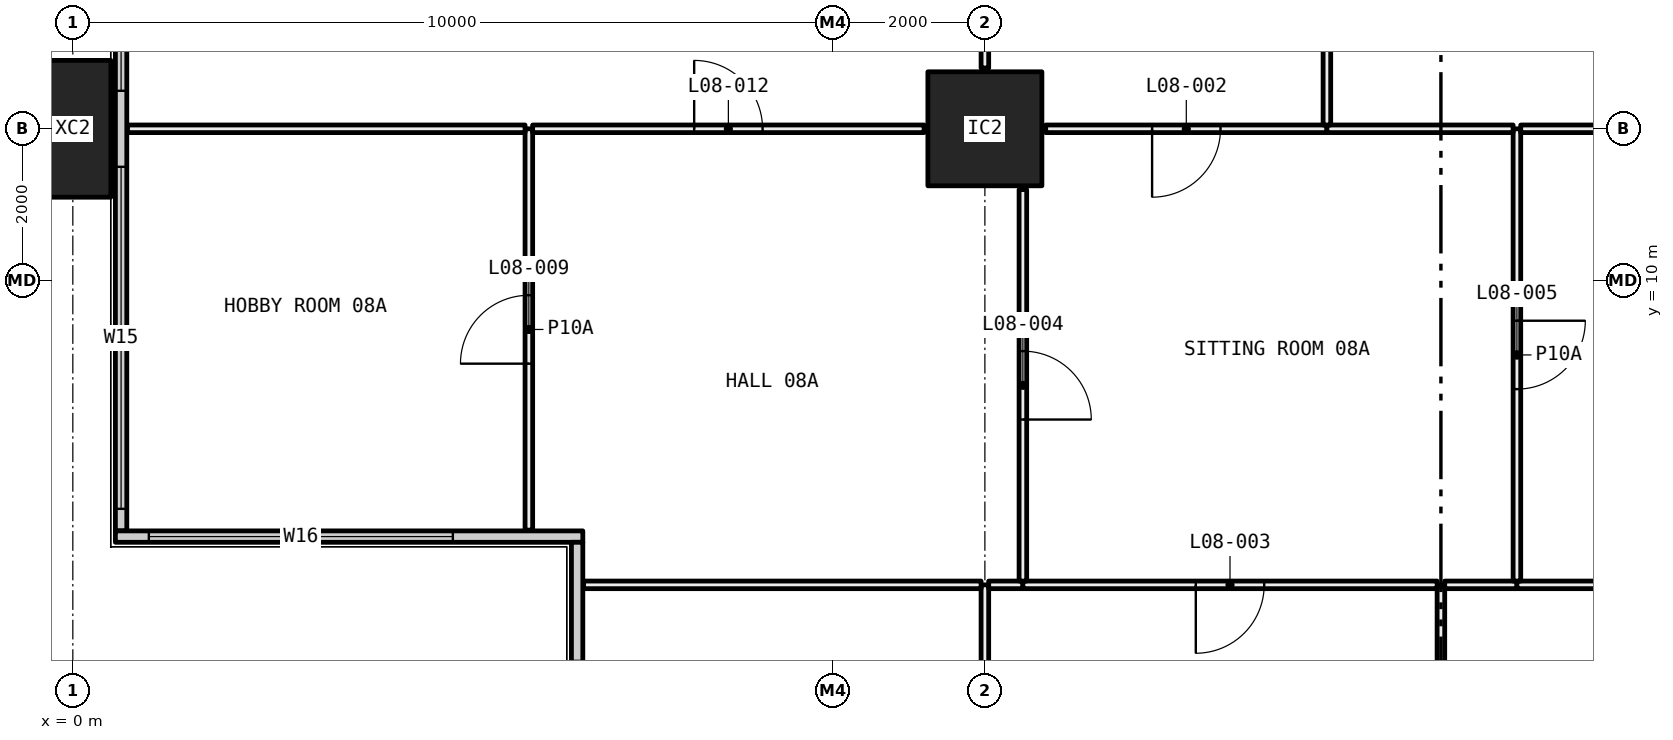
"""IFC4 building model, lengths in metres.
Left out: names, types, materials, properties, quantities, classifications, styles, units other than length and angle.
Written with IfcOpenShell. Run it as: python <this file> out.ifc"""

import sys

from ifc_helpers import new_model, si_unit, direction, frame, frame_2d, origin, origin_2d, place, context, subcontext, project, spatial, rectangle, hollow_rectangle, extrude, element, fill, save


model = new_model("IFC4")
c1 = context("Model", 3, precision=1e-05, world=origin(), true_north=direction((0.0, 1.0)))
c2 = subcontext(c1, "Body", "Model", "MODEL_VIEW")
j1 = project(units=[si_unit("LENGTHUNIT", "METRE"), si_unit("PLANEANGLEUNIT", "RADIAN")], contexts=[c1])
p1 = place(None, origin())
s1 = spatial("IfcSite", under=j1, at=p1, CompositionType="ELEMENT")
p2 = place(p1, origin())
s2 = spatial("IfcBuilding", under=s1, at=p2, CompositionType="ELEMENT")
p3 = place(p2, frame((0.0, 0.0, 40.35)))
s3 = spatial("IfcBuildingStorey", under=s2, at=p3, CompositionType="ELEMENT", Elevation=40.35)
p4 = place(p3, frame((0.0, 12.0, -0.4), z_axis=(0.0, 0.0, 1.0), x_axis=(0.0, 1.0, 0.0)))
e1 = element("IfcColumn", 1, at=p4, inside=s3, PredefinedType="COLUMN", context=c2, shape_type="SweptSolid", body=[
    extrude(hollow_rectangle(XDim=1.8, YDim=1.0, WallThickness=0.07, at=origin_2d()), origin(), (0.0, 0.0, 1.0), 3.45),
])
p5 = place(p3, frame((12.0, 12.0, 0.0), z_axis=(0.0, 0.0, 1.0), x_axis=(1.0, 0.0, 0.0)))
e2 = element("IfcColumn", 2, at=p5, inside=s3, PredefinedType="COLUMN", context=c2, shape_type="SweptSolid", body=[
    extrude(hollow_rectangle(XDim=1.5, YDim=1.5, WallThickness=0.065, at=origin_2d()), origin(), (0.0, 0.0, 1.0), 3.05),
])
p6 = place(p3, frame((0.635, 6.71, 0.0), z_axis=(0.0, 0.0, 1.0), x_axis=(0.0, 1.0, 0.0)))
e3 = element("IfcWall", 3, at=p6, inside=s3, PredefinedType="ELEMENTEDWALL", context=c2, shape_type="SweptSolid", body=[
    extrude(rectangle(XDim=34.58, YDim=0.15, at=frame_2d((17.29, 0.0))), origin(), (0.0, 0.0, 1.0), 3.05),
])
p7 = place(p6, frame((0.29, 0.0, 0.45)))
e4 = element("IfcOpeningElement", 4, at=p7, cuts=e3, PredefinedType="OPENING", context=c2, shape_type="SweptSolid", body=[
    extrude(rectangle(XDim=4.5, YDim=2.55, at=frame_2d((2.25, 1.275))), frame((0.0, 0.085, 0.0), z_axis=(0.0, -1.0, 0.0), x_axis=(1.0, 0.0, 0.0)), (0.0, 0.0, 1.0), 0.17),
])
p8 = place(p6, frame((5.79, 0.0, 0.45)))
e5 = element("IfcOpeningElement", 5, at=p8, cuts=e3, PredefinedType="OPENING", context=c2, shape_type="SweptSolid", body=[
    extrude(rectangle(XDim=3.0, YDim=2.55, at=frame_2d((1.5, 1.275))), frame((0.0, 0.085, 0.0), z_axis=(0.0, -1.0, 0.0), x_axis=(1.0, 0.0, 0.0)), (0.0, 0.0, 1.0), 0.17),
])
p9 = place(p6, frame((13.79, 0.0, 0.45)))
e6 = element("IfcOpeningElement", 6, at=p9, cuts=e3, PredefinedType="OPENING", context=c2, shape_type="SweptSolid", body=[
    extrude(rectangle(XDim=3.0, YDim=2.55, at=frame_2d((1.5, 1.275))), frame((0.0, 0.085, 0.0), z_axis=(0.0, -1.0, 0.0), x_axis=(1.0, 0.0, 0.0)), (0.0, 0.0, 1.0), 0.17),
])
p10 = place(p6, frame((17.79, 0.0, 0.45)))
e7 = element("IfcOpeningElement", 7, at=p10, cuts=e3, PredefinedType="OPENING", context=c2, shape_type="SweptSolid", body=[
    extrude(rectangle(XDim=3.0, YDim=2.55, at=frame_2d((1.5, 1.275))), frame((0.0, 0.085, 0.0), z_axis=(0.0, -1.0, 0.0), x_axis=(1.0, 0.0, 0.0)), (0.0, 0.0, 1.0), 0.17),
])
p11 = place(p6, frame((26.79, 0.0, 0.45)))
e8 = element("IfcOpeningElement", 8, at=p11, cuts=e3, PredefinedType="OPENING", context=c2, shape_type="SweptSolid", body=[
    extrude(rectangle(XDim=2.0, YDim=2.55, at=frame_2d((1.0, 1.275))), frame((0.0, 0.085, 0.0), z_axis=(0.0, -1.0, 0.0), x_axis=(1.0, 0.0, 0.0)), (0.0, 0.0, 1.0), 0.17),
])
p12 = place(p6, frame((29.79, 0.0, 0.45)))
e9 = element("IfcOpeningElement", 9, at=p12, cuts=e3, PredefinedType="OPENING", context=c2, shape_type="SweptSolid", body=[
    extrude(rectangle(XDim=4.5, YDim=2.55, at=frame_2d((2.25, 1.275))), frame((0.0, 0.085, 0.0), z_axis=(0.0, -1.0, 0.0), x_axis=(1.0, 0.0, 0.0)), (0.0, 0.0, 1.0), 0.17),
])
p13 = place(p3, frame((0.56, 6.635, 0.0), z_axis=(0.0, 0.0, 1.0), x_axis=(1.0, 0.0, 0.0)))
e10 = element("IfcWall", 10, at=p13, inside=s3, PredefinedType="ELEMENTEDWALL", context=c2, shape_type="SweptSolid", body=[
    extrude(rectangle(XDim=6.15, YDim=0.15, at=frame_2d((3.075, 0.0))), origin(), (0.0, 0.0, 1.0), 3.05),
])
p14 = place(p13, frame((0.44, 0.0, 0.45)))
e11 = element("IfcOpeningElement", 11, at=p14, cuts=e10, PredefinedType="OPENING", context=c2, shape_type="SweptSolid", body=[
    extrude(rectangle(XDim=4.0, YDim=2.55, at=frame_2d((2.0, 1.275))), frame((0.0, 0.085, 0.0), z_axis=(0.0, -1.0, 0.0), x_axis=(1.0, 0.0, 0.0)), (0.0, 0.0, 1.0), 0.17),
])
p15 = place(p3, frame((6.635, 0.71, 0.0), z_axis=(0.0, 0.0, 1.0), x_axis=(0.0, 1.0, 0.0)))
e12 = element("IfcWall", 12, at=p15, inside=s3, PredefinedType="ELEMENTEDWALL", context=c2, shape_type="SweptSolid", body=[
    extrude(rectangle(XDim=5.85, YDim=0.15, at=frame_2d((2.925, 0.0))), origin(), (0.0, 0.0, 1.0), 3.05),
])
p16 = place(p15, frame((0.29, 0.0, 0.45)))
e13 = element("IfcOpeningElement", 13, at=p16, cuts=e12, PredefinedType="OPENING", context=c2, shape_type="SweptSolid", body=[
    extrude(rectangle(XDim=4.0, YDim=2.55, at=frame_2d((2.0, 1.275))), frame((0.0, 0.085, 0.0), z_axis=(0.0, -1.0, 0.0), x_axis=(1.0, 0.0, 0.0)), (0.0, 0.0, 1.0), 0.17),
])
p17 = place(p3, frame((12.0, 0.72, 0.0), z_axis=(0.0, 0.0, 1.0), x_axis=(0.0, 1.0, 0.0)))
e14 = element("IfcWall", 14, at=p17, inside=s3, PredefinedType="PARTITIONING", context=c2, shape_type="SweptSolid", body=[
    extrude(rectangle(XDim=5.28, YDim=0.1, at=frame_2d((2.64, 0.0))), origin(), (0.0, 0.0, 1.0), 2.45),
])
p18 = place(p17, frame((2.19, 0.0, 0.0)))
e15 = element("IfcOpeningElement", 15, at=p18, cuts=e14, PredefinedType="OPENING", context=c2, shape_type="SweptSolid", body=[
    extrude(rectangle(XDim=0.9, YDim=2.1, at=frame_2d((0.45, 1.05))), frame((0.0, 0.06, 0.0), z_axis=(0.0, -1.0, 0.0), x_axis=(1.0, 0.0, 0.0)), (0.0, 0.0, 1.0), 0.12),
])
p19 = place(p3, frame((11.95, 6.0, 0.0), z_axis=(0.0, 0.0, 1.0), x_axis=(-1.0, 0.0, 0.0)))
e16 = element("IfcWall", 16, at=p19, inside=s3, PredefinedType="PARTITIONING", context=c2, shape_type="SweptSolid", body=[
    extrude(rectangle(XDim=5.23, YDim=0.1, at=frame_2d((2.615, 0.0))), origin(), (0.0, 0.0, 1.0), 2.45),
])
p20 = place(p3, frame((18.0, 0.72, 0.0), z_axis=(0.0, 0.0, 1.0), x_axis=(0.0, 1.0, 0.0)))
e17 = element("IfcWall", 17, at=p20, inside=s3, PredefinedType="PARTITIONING", context=c2, shape_type="SweptSolid", body=[
    extrude(rectangle(XDim=5.28, YDim=0.1, at=frame_2d((2.64, 0.0))), origin(), (0.0, 0.0, 1.0), 3.05),
])
p21 = place(p20, frame((2.19, 0.0, 0.0)))
e18 = element("IfcOpeningElement", 18, at=p21, cuts=e17, PredefinedType="OPENING", context=c2, shape_type="SweptSolid", body=[
    extrude(rectangle(XDim=0.9, YDim=2.1, at=frame_2d((0.45, 1.05))), frame((0.0, 0.06, 0.0), z_axis=(0.0, -1.0, 0.0), x_axis=(1.0, 0.0, 0.0)), (0.0, 0.0, 1.0), 0.12),
])
p22 = place(p3, frame((12.5, 6.0, 0.0), z_axis=(0.0, 0.0, 1.0), x_axis=(-1.0, 0.0, 0.0)))
e19 = element("IfcWall", 19, at=p22, inside=s3, PredefinedType="PARTITIONING", context=c2, shape_type="SweptSolid", body=[
    extrude(rectangle(XDim=0.45, YDim=0.1, at=frame_2d((0.225, 0.0))), origin(), (0.0, 0.0, 1.0), 2.45),
])
p23 = place(p3, frame((17.95, 6.0, 0.0), z_axis=(0.0, 0.0, 1.0), x_axis=(-1.0, 0.0, 0.0)))
e20 = element("IfcWall", 20, at=p23, inside=s3, PredefinedType="PARTITIONING", context=c2, shape_type="SweptSolid", body=[
    extrude(rectangle(XDim=5.45, YDim=0.1, at=frame_2d((2.725, 0.0))), origin(), (0.0, 0.0, 1.0), 3.05),
])
p24 = place(p23, frame((2.275, 0.0, 0.0)))
e21 = element("IfcOpeningElement", 21, at=p24, cuts=e20, PredefinedType="OPENING", context=c2, shape_type="SweptSolid", body=[
    extrude(rectangle(XDim=0.9, YDim=2.1, at=frame_2d((0.45, 1.05))), frame((0.0, 0.06, 0.0), z_axis=(0.0, -1.0, 0.0), x_axis=(1.0, 0.0, 0.0)), (0.0, 0.0, 1.0), 0.12),
])
p25 = place(p3, frame((19.0, 6.0, 0.0), z_axis=(0.0, 0.0, 1.0), x_axis=(-1.0, 0.0, 0.0)))
e22 = element("IfcWall", 22, at=p25, inside=s3, PredefinedType="PARTITIONING", context=c2, shape_type="SweptSolid", body=[
    extrude(rectangle(XDim=0.95, YDim=0.1, at=frame_2d((0.475, 0.0))), origin(), (0.0, 0.0, 1.0), 3.05),
])
p26 = place(p3, frame((23.95, 6.0, 0.0), z_axis=(0.0, 0.0, 1.0), x_axis=(-1.0, 0.0, 0.0)))
e23 = element("IfcWall", 23, at=p26, inside=s3, PredefinedType="PARTITIONING", context=c2, shape_type="SweptSolid", body=[
    extrude(rectangle(XDim=4.95, YDim=0.1, at=frame_2d((2.475, 0.0))), origin(), (0.0, 0.0, 1.0), 2.45),
])
p27 = place(p3, frame((6.0, 6.72, 0.0), z_axis=(0.0, 0.0, 1.0), x_axis=(0.0, 1.0, 0.0)))
e24 = element("IfcWall", 24, at=p27, inside=s3, PredefinedType="PARTITIONING", context=c2, shape_type="SweptSolid", body=[
    extrude(rectangle(XDim=5.28, YDim=0.1, at=frame_2d((2.64, 0.0))), origin(), (0.0, 0.0, 1.0), 2.45),
])
p28 = place(p27, frame((2.19, 0.0, 0.0)))
e25 = element("IfcOpeningElement", 25, at=p28, cuts=e24, PredefinedType="OPENING", context=c2, shape_type="SweptSolid", body=[
    extrude(rectangle(XDim=0.9, YDim=2.1, at=frame_2d((0.45, 1.05))), frame((0.0, 0.06, 0.0), z_axis=(0.0, -1.0, 0.0), x_axis=(1.0, 0.0, 0.0)), (0.0, 0.0, 1.0), 0.12),
])
p29 = place(p3, frame((5.95, 12.0, 0.0), z_axis=(0.0, 0.0, 1.0), x_axis=(-1.0, 0.0, 0.0)))
e26 = element("IfcWall", 26, at=p29, inside=s3, PredefinedType="PARTITIONING", context=c2, shape_type="SweptSolid", body=[
    extrude(rectangle(XDim=5.23, YDim=0.1, at=frame_2d((2.615, 0.0))), origin(), (0.0, 0.0, 1.0), 2.45),
])
p30 = place(p3, frame((12.5, 6.05, 0.0), z_axis=(0.0, 0.0, 1.0), x_axis=(0.0, 1.0, 0.0)))
e27 = element("IfcWall", 27, at=p30, inside=s3, PredefinedType="PARTITIONING", context=c2, shape_type="SweptSolid", body=[
    extrude(rectangle(XDim=5.15, YDim=0.1, at=frame_2d((2.575, 0.0))), origin(), (0.0, 0.0, 1.0), 3.05),
])
p31 = place(p30, frame((2.125, 0.0, 0.0)))
e28 = element("IfcOpeningElement", 28, at=p31, cuts=e27, PredefinedType="OPENING", context=c2, shape_type="SweptSolid", body=[
    extrude(rectangle(XDim=0.9, YDim=2.1, at=frame_2d((0.45, 1.05))), frame((0.0, 0.06, 0.0), z_axis=(0.0, -1.0, 0.0), x_axis=(1.0, 0.0, 0.0)), (0.0, 0.0, 1.0), 0.12),
])
p32 = place(p3, frame((11.2, 12.0, 0.0), z_axis=(0.0, 0.0, 1.0), x_axis=(-1.0, 0.0, 0.0)))
e29 = element("IfcWall", 29, at=p32, inside=s3, PredefinedType="PARTITIONING", context=c2, shape_type="SweptSolid", body=[
    extrude(rectangle(XDim=5.15, YDim=0.1, at=frame_2d((2.575, 0.0))), origin(), (0.0, 0.0, 1.0), 2.45),
])
p33 = place(p32, frame((2.125, 0.0, 0.0)))
e30 = element("IfcOpeningElement", 30, at=p33, cuts=e29, PredefinedType="OPENING", context=c2, shape_type="SweptSolid", body=[
    extrude(rectangle(XDim=0.9, YDim=2.1, at=frame_2d((0.45, 1.05))), frame((0.0, 0.06, 0.0), z_axis=(0.0, -1.0, 0.0), x_axis=(1.0, 0.0, 0.0)), (0.0, 0.0, 1.0), 0.12),
])
p34 = place(p3, frame((19.0, 6.05, 0.0), z_axis=(0.0, 0.0, 1.0), x_axis=(0.0, 1.0, 0.0)))
e31 = element("IfcWall", 31, at=p34, inside=s3, PredefinedType="PARTITIONING", context=c2, shape_type="SweptSolid", body=[
    extrude(rectangle(XDim=5.95, YDim=0.1, at=frame_2d((2.975, 0.0))), origin(), (0.0, 0.0, 1.0), 2.45),
])
p35 = place(p34, frame((2.525, 0.0, 0.0)))
e32 = element("IfcOpeningElement", 32, at=p35, cuts=e31, PredefinedType="OPENING", context=c2, shape_type="SweptSolid", body=[
    extrude(rectangle(XDim=0.9, YDim=2.1, at=frame_2d((0.45, 1.05))), frame((0.0, 0.06, 0.0), z_axis=(0.0, -1.0, 0.0), x_axis=(1.0, 0.0, 0.0)), (0.0, 0.0, 1.0), 0.12),
])
p36 = place(p3, frame((16.5, 12.0, 0.0), z_axis=(0.0, 0.0, 1.0), x_axis=(-1.0, 0.0, 0.0)))
e33 = element("IfcWall", 33, at=p36, inside=s3, PredefinedType="PARTITIONING", context=c2, shape_type="SweptSolid", body=[
    extrude(rectangle(XDim=3.7, YDim=0.1, at=frame_2d((1.85, 0.0))), origin(), (0.0, 0.0, 1.0), 2.45),
])
p37 = place(p36, frame((1.4, 0.0, 0.0)))
e34 = element("IfcOpeningElement", 34, at=p37, cuts=e33, PredefinedType="OPENING", context=c2, shape_type="SweptSolid", body=[
    extrude(rectangle(XDim=0.9, YDim=2.1, at=frame_2d((0.45, 1.05))), frame((0.0, 0.06, 0.0), z_axis=(0.0, -1.0, 0.0), x_axis=(1.0, 0.0, 0.0)), (0.0, 0.0, 1.0), 0.12),
])
p38 = place(p3, frame((18.95, 12.0, 0.0), z_axis=(0.0, 0.0, 1.0), x_axis=(-1.0, 0.0, 0.0)))
e35 = element("IfcWall", 35, at=p38, inside=s3, PredefinedType="PARTITIONING", context=c2, shape_type="SweptSolid", body=[
    extrude(rectangle(XDim=2.45, YDim=0.1, at=frame_2d((1.225, 0.0))), origin(), (0.0, 0.0, 1.0), 2.45),
])
p39 = place(p3, frame((23.2, 12.0, 0.0), z_axis=(0.0, 0.0, 1.0), x_axis=(-1.0, 0.0, 0.0)))
e36 = element("IfcWall", 36, at=p39, inside=s3, PredefinedType="PARTITIONING", context=c2, shape_type="SweptSolid", body=[
    extrude(rectangle(XDim=4.15, YDim=0.1, at=frame_2d((2.075, 0.0))), origin(), (0.0, 0.0, 1.0), 2.45),
])
p40 = place(p3, frame((12.0, 12.8, 0.0), z_axis=(0.0, 0.0, 1.0), x_axis=(0.0, 1.0, 0.0)))
e37 = element("IfcWall", 37, at=p40, inside=s3, PredefinedType="PARTITIONING", context=c2, shape_type="SweptSolid", body=[
    extrude(rectangle(XDim=5.1, YDim=0.1, at=frame_2d((2.55, 0.0))), origin(), (0.0, 0.0, 1.0), 3.05),
])
p41 = place(p3, frame((16.5, 12.05, 0.0), z_axis=(0.0, 0.0, 1.0), x_axis=(0.0, 1.0, 0.0)))
e38 = element("IfcWall", 38, at=p41, inside=s3, PredefinedType="PARTITIONING", context=c2, shape_type="SweptSolid", body=[
    extrude(rectangle(XDim=5.85, YDim=0.1, at=frame_2d((2.925, 0.0))), origin(), (0.0, 0.0, 1.0), 2.45),
])
p42 = place(p41, frame((2.475, 0.0, 0.0)))
e39 = element("IfcOpeningElement", 39, at=p42, cuts=e38, PredefinedType="OPENING", context=c2, shape_type="SweptSolid", body=[
    extrude(rectangle(XDim=0.9, YDim=2.1, at=frame_2d((0.45, 1.05))), frame((0.0, 0.06, 0.0), z_axis=(0.0, -1.0, 0.0), x_axis=(1.0, 0.0, 0.0)), (0.0, 0.0, 1.0), 0.12),
])
p43 = place(p7, origin())
e40 = element("IfcWindow", 40, at=p43, inside=s3, PartitioningType="SINGLE_PANEL", PredefinedType="WINDOW", context=c2, shape_type="SweptSolid", body=[
    extrude(rectangle(XDim=4.5, YDim=2.55, at=frame_2d((2.25, 1.275))), frame((0.0, 0.03, 0.0), z_axis=(0.0, -1.0, 0.0), x_axis=(1.0, 0.0, 0.0)), (0.0, 0.0, 1.0), 0.06),
])
fill(e4, e40)
p44 = place(p8, origin())
e41 = element("IfcWindow", 41, at=p44, inside=s3, PartitioningType="SINGLE_PANEL", PredefinedType="WINDOW", context=c2, shape_type="SweptSolid", body=[
    extrude(rectangle(XDim=3.0, YDim=2.55, at=frame_2d((1.5, 1.275))), frame((0.0, 0.03, 0.0), z_axis=(0.0, -1.0, 0.0), x_axis=(1.0, 0.0, 0.0)), (0.0, 0.0, 1.0), 0.06),
])
fill(e5, e41)
p45 = place(p14, origin())
e42 = element("IfcWindow", 42, at=p45, inside=s3, PartitioningType="SINGLE_PANEL", PredefinedType="WINDOW", context=c2, shape_type="SweptSolid", body=[
    extrude(rectangle(XDim=4.0, YDim=2.55, at=frame_2d((2.0, 1.275))), frame((0.0, 0.03, 0.0), z_axis=(0.0, -1.0, 0.0), x_axis=(1.0, 0.0, 0.0)), (0.0, 0.0, 1.0), 0.06),
])
fill(e11, e42)
p46 = place(p37, origin())
e43 = element("IfcDoor", 43, at=p46, inside=s3, OperationType="SINGLE_SWING_LEFT", PredefinedType="DOOR", context=c2, shape_type="SweptSolid", body=[
    extrude(rectangle(XDim=0.9, YDim=2.1, at=frame_2d((0.45, 1.05))), frame((0.0, 0.025, 0.0), z_axis=(0.0, -1.0, 0.0), x_axis=(1.0, 0.0, 0.0)), (0.0, 0.0, 1.0), 0.05),
])
fill(e34, e43)
p47 = place(p24, origin())
e44 = element("IfcDoor", 44, at=p47, inside=s3, OperationType="SINGLE_SWING_LEFT", PredefinedType="DOOR", context=c2, shape_type="SweptSolid", body=[
    extrude(rectangle(XDim=0.9, YDim=2.1, at=frame_2d((0.45, 1.05))), frame((0.0, 0.025, 0.0), z_axis=(0.0, -1.0, 0.0), x_axis=(1.0, 0.0, 0.0)), (0.0, 0.0, 1.0), 0.05),
])
fill(e21, e44)
p48 = place(p31, frame((0.9, 0.0, 0.0), x_axis=(-1.0, 0.0, 0.0)))
e45 = element("IfcDoor", 45, at=p48, inside=s3, OperationType="SINGLE_SWING_LEFT", PredefinedType="DOOR", context=c2, shape_type="SweptSolid", body=[
    extrude(rectangle(XDim=0.9, YDim=2.1, at=frame_2d((0.45, 1.05))), frame((0.0, 0.025, 0.0), z_axis=(0.0, -1.0, 0.0), x_axis=(1.0, 0.0, 0.0)), (0.0, 0.0, 1.0), 0.05),
])
fill(e28, e45)
p49 = place(p35, frame((0.9, 0.0, 0.0), x_axis=(-1.0, 0.0, 0.0)))
e46 = element("IfcDoor", 46, at=p49, inside=s3, OperationType="SINGLE_SWING_RIGHT", PredefinedType="DOOR", context=c2, shape_type="SweptSolid", body=[
    extrude(rectangle(XDim=0.9, YDim=2.1, at=frame_2d((0.45, 1.05))), frame((0.0, 0.025, 0.0), z_axis=(0.0, -1.0, 0.0), x_axis=(1.0, 0.0, 0.0)), (0.0, 0.0, 1.0), 0.05),
])
fill(e32, e46)
p50 = place(p28, origin())
e47 = element("IfcDoor", 47, at=p50, inside=s3, OperationType="SINGLE_SWING_RIGHT", PredefinedType="DOOR", context=c2, shape_type="SweptSolid", body=[
    extrude(rectangle(XDim=0.9, YDim=2.1, at=frame_2d((0.45, 1.05))), frame((0.0, 0.025, 0.0), z_axis=(0.0, -1.0, 0.0), x_axis=(1.0, 0.0, 0.0)), (0.0, 0.0, 1.0), 0.05),
])
fill(e25, e47)
p51 = place(p33, frame((0.9, 0.0, 0.0), x_axis=(-1.0, 0.0, 0.0)))
e48 = element("IfcDoor", 48, at=p51, inside=s3, OperationType="SINGLE_SWING_RIGHT", PredefinedType="DOOR", context=c2, shape_type="SweptSolid", body=[
    extrude(rectangle(XDim=0.9, YDim=2.1, at=frame_2d((0.45, 1.05))), frame((0.0, 0.025, 0.0), z_axis=(0.0, -1.0, 0.0), x_axis=(1.0, 0.0, 0.0)), (0.0, 0.0, 1.0), 0.05),
])
fill(e30, e48)
save(model, sys.argv[1])
